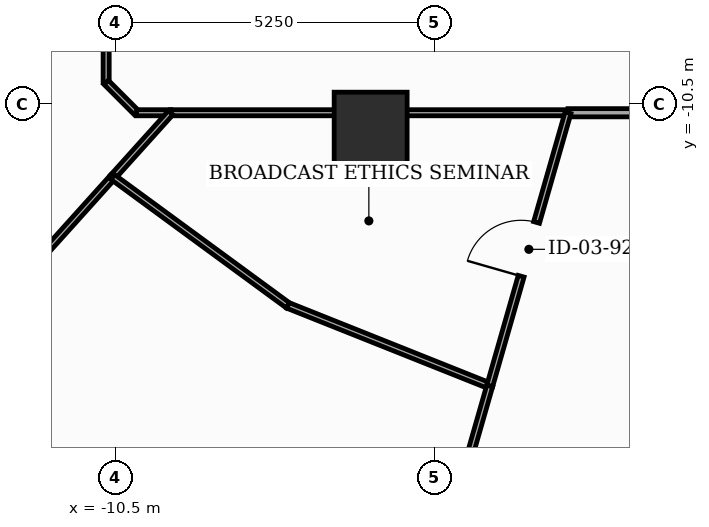
"""IFC4 building model, lengths in metres.
Left out: names, types, materials, properties, quantities, classifications, styles, units other than length and angle.
Written with IfcOpenShell. Run it as: python <this file> out.ifc"""

import sys

from ifc_helpers import new_model, si_unit, direction, frame, frame_2d, origin, origin_2d, place, context, subcontext, project, spatial, rectangle, extrude, element, fill, save


model = new_model("IFC4")
c1 = context("Model", 3, precision=1e-05, world=origin(), true_north=direction((0.0, 1.0)))
c2 = subcontext(c1, "Body", "Model", "MODEL_VIEW")
j1 = project(units=[si_unit("LENGTHUNIT", "METRE"), si_unit("PLANEANGLEUNIT", "RADIAN")], contexts=[c1])
p1 = place(None, origin())
s1 = spatial("IfcSite", under=j1, at=p1, CompositionType="ELEMENT")
p2 = place(p1, origin())
s2 = spatial("IfcBuilding", under=s1, at=p2, CompositionType="ELEMENT")
p3 = place(p2, frame((0.0, 0.0, 165.7)))
s3 = spatial("IfcBuildingStorey", under=s2, at=p3, CompositionType="ELEMENT", Elevation=165.7)
p4 = place(p3, frame((-6.3, -10.912, 0.0), z_axis=(0.0, 0.0, 1.0), x_axis=(1.0, 0.0, 0.0)))
e1 = element("IfcColumn", 1, at=p4, inside=s3, PredefinedType="COLUMN", context=c2, shape_type="SweptSolid", body=[
    extrude(rectangle(XDim=1.2, YDim=1.2, at=origin_2d()), origin(), (0.0, 0.0, 1.0), 3.7),
])
p5 = place(p3, frame((-10.65, -4.85, 0.0), z_axis=(0.0, 0.0, 1.0), x_axis=(0.0, -1.0, 0.0)))
e2 = element("IfcWall", 2, at=p5, inside=s3, PredefinedType="MOVABLE", context=c2, shape_type="SweptSolid", body=[
    extrude(rectangle(XDim=5.3, YDim=0.1, at=frame_2d((2.65, 0.0))), origin(), (0.0, 0.0, 1.0), 2.885),
])
p6 = place(p5, frame((3.78, 0.0, 0.0)))
e3 = element("IfcOpeningElement", 3, at=p6, cuts=e2, PredefinedType="OPENING", context=c2, shape_type="SweptSolid", body=[
    extrude(rectangle(XDim=0.92, YDim=2.1, at=frame_2d((0.46, 1.05))), frame((0.0, 0.06, 0.0), z_axis=(0.0, -1.0, 0.0), x_axis=(1.0, 0.0, 0.0)), (0.0, 0.0, 1.0), 0.12),
])
p7 = place(p3, frame((-10.65, -10.15, 0.0), z_axis=(0.0, 0.0, 1.0), x_axis=(0.707106781187, -0.707106781187, 0.0)))
e4 = element("IfcWall", 4, at=p7, inside=s3, PredefinedType="MOVABLE", context=c2, shape_type="SweptSolid", body=[
    extrude(rectangle(XDim=0.707, YDim=0.1, at=frame_2d((0.354, 0.0))), origin(), (0.0, 0.0, 1.0), 3.5),
])
p8 = place(p3, frame((-10.15, -10.65, 0.0), z_axis=(0.0, 0.0, 1.0), x_axis=(1.0, 0.0, 0.0)))
e5 = element("IfcWall", 5, at=p8, inside=s3, PredefinedType="MOVABLE", context=c2, shape_type="SweptSolid", body=[
    extrude(rectangle(XDim=0.561, YDim=0.1, at=frame_2d((0.28, 0.0))), origin(), (0.0, 0.0, 1.0), 3.5),
])
p9 = place(p3, frame((-9.589, -10.65, 0.0), z_axis=(0.0, 0.0, 1.0), x_axis=(1.0, 0.0, 0.0)))
e6 = element("IfcWall", 6, at=p9, inside=s3, PredefinedType="MOVABLE", context=c2, shape_type="SweptSolid", body=[
    extrude(rectangle(XDim=6.535, YDim=0.1, at=frame_2d((3.268, 0.0))), origin(), (0.0, 0.0, 1.0), 2.885),
])
p10 = place(p3, frame((-3.054, -10.65, 0.0), z_axis=(0.0, 0.0, 1.0), x_axis=(1.0, 0.0, 0.0)))
e7 = element("IfcWall", 7, at=p10, inside=s3, PredefinedType="PARTITIONING", context=c2, shape_type="SweptSolid", body=[
    extrude(rectangle(XDim=10.792, YDim=0.135, at=frame_2d((5.396, 0.0))), origin(), (0.0, 0.0, 1.0), 2.885),
])
p11 = place(p10, frame((4.596, 0.0, 0.0)))
e8 = element("IfcOpeningElement", 8, at=p11, cuts=e7, PredefinedType="OPENING", context=c2, shape_type="SweptSolid", body=[
    extrude(rectangle(XDim=1.6, YDim=2.15, at=frame_2d((0.8, 1.075))), frame((0.0, 0.077, 0.0), z_axis=(0.0, -1.0, 0.0), x_axis=(1.0, 0.0, 0.0)), (0.0, 0.0, 1.0), 0.155),
])
p12 = place(p3, frame((-10.541, -11.707, 0.0), z_axis=(0.0, 0.0, 1.0), x_axis=(0.669154347467, 0.743123448201, 0.0)))
e9 = element("IfcWall", 9, at=p12, inside=s3, PredefinedType="MOVABLE", context=c2, shape_type="SweptSolid", body=[
    extrude(rectangle(XDim=1.423, YDim=0.1, at=frame_2d((0.711, 0.0))), origin(), (0.0, 0.0, 1.0), 3.5),
])
p13 = place(p3, frame((-15.528, -17.245, 0.0), z_axis=(0.0, 0.0, 1.0), x_axis=(0.669169234172, 0.74311004302, 0.0)))
e10 = element("IfcWall", 10, at=p13, inside=s3, PredefinedType="MOVABLE", context=c2, shape_type="SweptSolid", body=[
    extrude(rectangle(XDim=7.452, YDim=0.1, at=frame_2d((3.726, 0.0))), origin(), (0.0, 0.0, 1.0), 2.885),
])
p14 = place(p3, frame((-10.541, -11.707, 0.0), z_axis=(0.0, 0.0, 1.0), x_axis=(0.806504929698, -0.591227366055, 0.0)))
e11 = element("IfcWall", 11, at=p14, inside=s3, PredefinedType="MOVABLE", context=c2, shape_type="SweptSolid", body=[
    extrude(rectangle(XDim=3.572, YDim=0.1, at=frame_2d((1.786, 0.0))), origin(), (0.0, 0.0, 1.0), 2.885),
])
p15 = place(p3, frame((-7.66, -13.819, 0.0), z_axis=(0.0, 0.0, 1.0), x_axis=(0.928782740603, -0.37062463593, 0.0)))
e12 = element("IfcWall", 12, at=p15, inside=s3, PredefinedType="MOVABLE", context=c2, shape_type="SweptSolid", body=[
    extrude(rectangle(XDim=3.572, YDim=0.1, at=frame_2d((1.786, 0.0))), origin(), (0.0, 0.0, 1.0), 3.5),
])
p16 = place(p3, frame((-4.342, -15.143, 0.0), z_axis=(0.0, 0.0, 1.0), x_axis=(0.275576442642, 0.961279160422, 0.0)))
e13 = element("IfcWall", 13, at=p16, inside=s3, PredefinedType="MOVABLE", context=c2, shape_type="SweptSolid", body=[
    extrude(rectangle(XDim=4.674, YDim=0.1, at=frame_2d((2.337, 0.0))), origin(), (0.0, 0.0, 1.0), 2.885),
])
p17 = place(p16, frame((1.877, 0.0, 0.0)))
e14 = element("IfcOpeningElement", 14, at=p17, cuts=e13, PredefinedType="OPENING", context=c2, shape_type="SweptSolid", body=[
    extrude(rectangle(XDim=0.92, YDim=2.1, at=frame_2d((0.46, 1.05))), frame((0.0, 0.06, 0.0), z_axis=(0.0, -1.0, 0.0), x_axis=(1.0, 0.0, 0.0)), (0.0, 0.0, 1.0), 0.12),
])
p18 = place(p3, frame((-7.721, -26.926, 0.0), z_axis=(0.0, 0.0, 1.0), x_axis=(0.275633812082, 0.961262712081, 0.0)))
e15 = element("IfcWall", 15, at=p18, inside=s3, PredefinedType="MOVABLE", context=c2, shape_type="SweptSolid", body=[
    extrude(rectangle(XDim=12.258, YDim=0.1, at=frame_2d((6.129, 0.0))), origin(), (0.0, 0.0, 1.0), 2.985),
])
p19 = place(p18, frame((5.669, 0.0, 0.0)))
e16 = element("IfcOpeningElement", 16, at=p19, cuts=e15, PredefinedType="OPENING", context=c2, shape_type="SweptSolid", body=[
    extrude(rectangle(XDim=0.92, YDim=2.1, at=frame_2d((0.46, 1.05))), frame((0.0, 0.06, 0.0), z_axis=(0.0, -1.0, 0.0), x_axis=(1.0, 0.0, 0.0)), (0.0, 0.0, 1.0), 0.12),
])
p20 = place(p17, origin())
e17 = element("IfcDoor", 17, at=p20, inside=s3, OperationType="SINGLE_SWING_LEFT", PredefinedType="DOOR", context=c2, shape_type="SweptSolid", body=[
    extrude(rectangle(XDim=0.92, YDim=2.1, at=frame_2d((0.46, 1.05))), frame((0.0, 0.025, 0.0), z_axis=(0.0, -1.0, 0.0), x_axis=(1.0, 0.0, 0.0)), (0.0, 0.0, 1.0), 0.05),
])
fill(e14, e17)
save(model, sys.argv[1])
